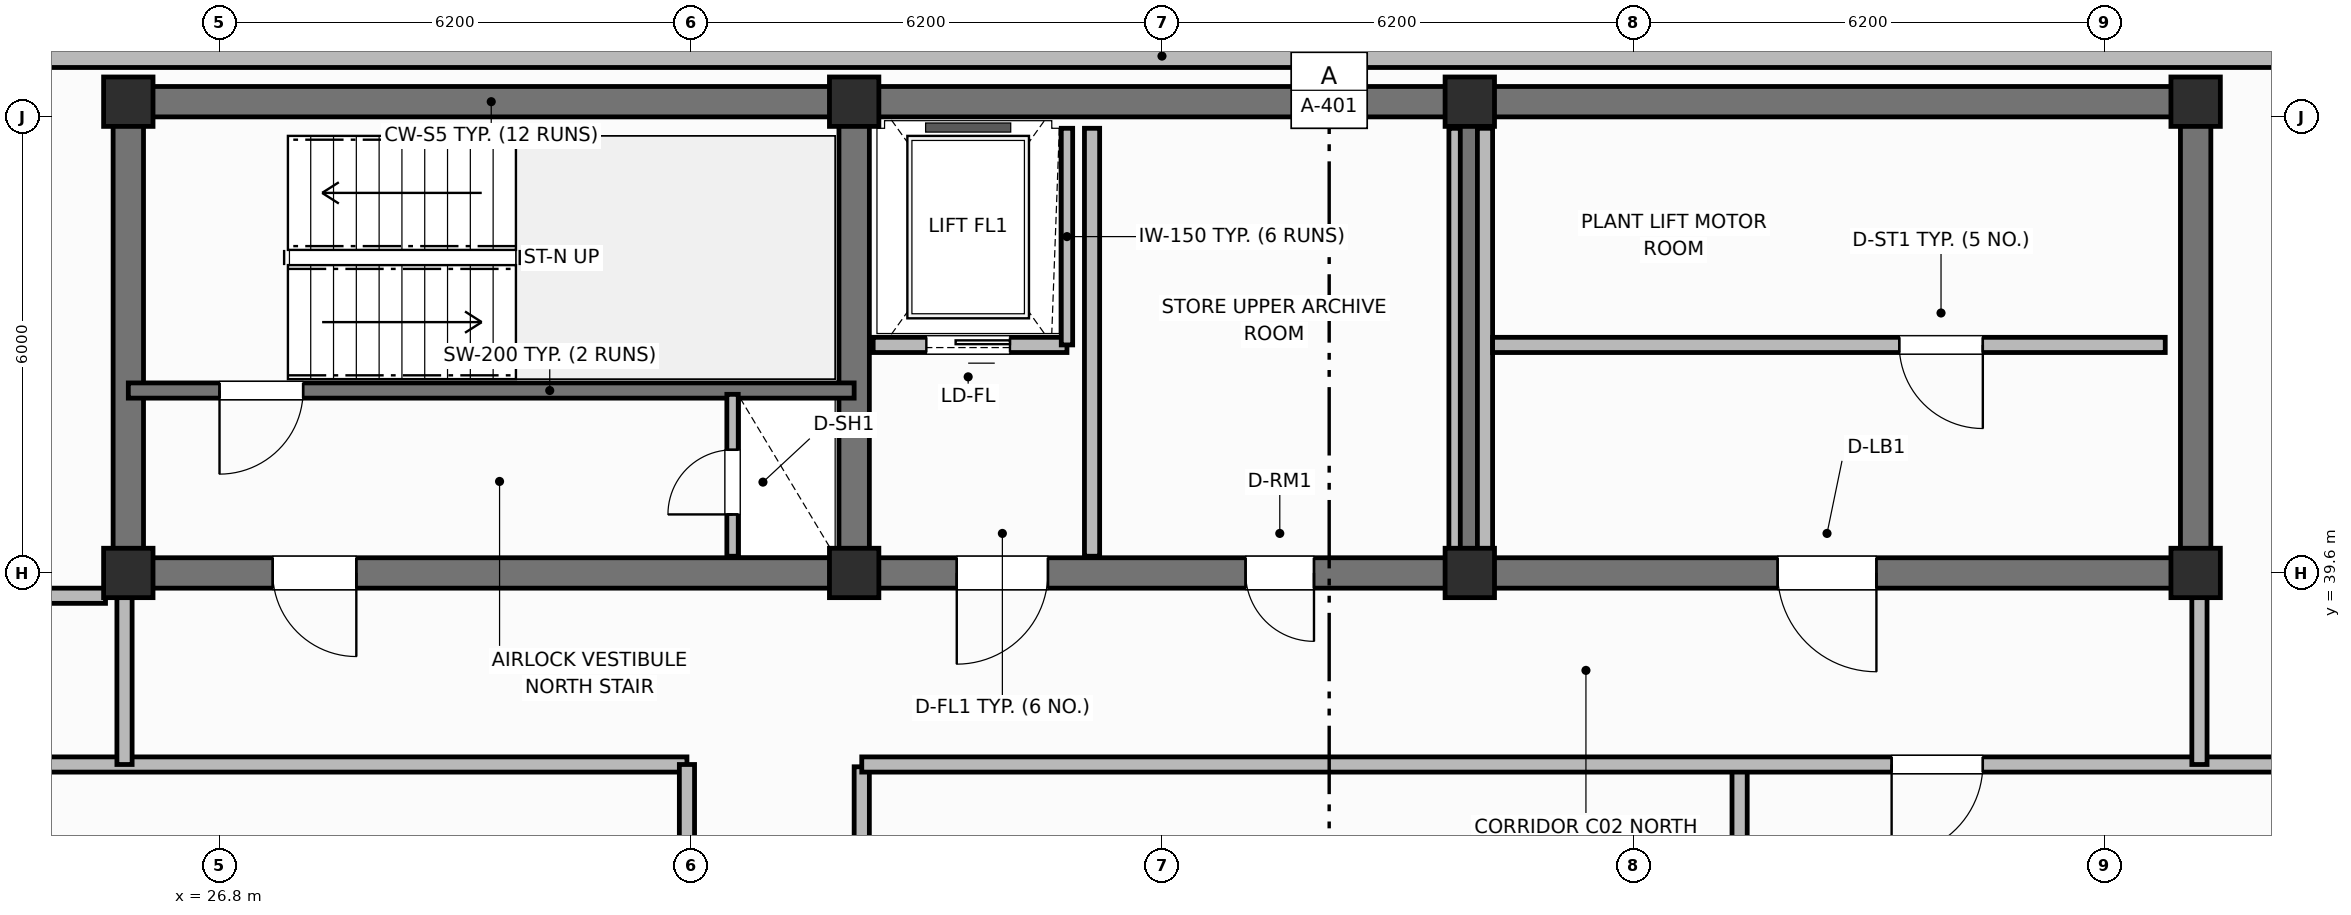
"""IFC4 building model, lengths in metres.
Left out: names, types, materials, properties, quantities, classifications, styles, units other than length and angle.
Written with IfcOpenShell. Run it as: python <this file> out.ifc"""

import sys

from ifc_helpers import new_model, si_unit, direction, frame, frame_2d, origin, origin_2d, place, context, subcontext, project, spatial, rectangle, extrude, element, fill, save


model = new_model("IFC4")
c1 = context("Model", 3, precision=1e-05, world=origin(), true_north=direction((0.0, 1.0)))
c2 = subcontext(c1, "Body", "Model", "MODEL_VIEW")
j1 = project(units=[si_unit("LENGTHUNIT", "METRE"), si_unit("PLANEANGLEUNIT", "RADIAN")], contexts=[c1])
p1 = place(None, origin())
s1 = spatial("IfcSite", under=j1, at=p1, CompositionType="ELEMENT")
p2 = place(p1, origin())
s2 = spatial("IfcBuilding", under=s1, at=p2, CompositionType="ELEMENT")
p3 = place(p2, frame((0.0, 0.0, 305.6)))
s3 = spatial("IfcBuildingStorey", under=s2, at=p3, CompositionType="ELEMENT", Elevation=305.6)
p4 = place(p3, frame((25.6, 45.8, 0.0), z_axis=(0.0, 0.0, 1.0), x_axis=(1.0, 0.0, 0.0)))
e1 = element("IfcWall", 1, at=p4, inside=s3, PredefinedType="SHEAR", context=c2, shape_type="SweptSolid", body=[
    extrude(rectangle(XDim=27.2, YDim=0.4, at=frame_2d((13.6, 0.0))), origin(), (0.0, 0.0, 1.0), 3.6),
])
for number, where, z_axis, x_axis in (
    (2, (25.6, 39.8, 0.0), (0.0, 0.0, 1.0), (0.0, 1.0, 0.0)),
    (3, (52.8, 39.8, 0.0), (0.0, 0.0, 1.0), (0.0, 1.0, 0.0)),
):
    element("IfcWall", number, at=place(p3, frame(where, z_axis=z_axis, x_axis=x_axis)), inside=s3, PredefinedType="SHEAR", context=c2, shape_type="SweptSolid", body=[
        extrude(rectangle(XDim=5.8, YDim=0.4, at=frame_2d((2.9, 0.0))), origin(), (0.0, 0.0, 1.0), 3.6),
    ])
p5 = place(p3, frame((52.8, 39.6, 0.0), z_axis=(0.0, 0.0, 1.0), x_axis=(-1.0, 0.0, 0.0)))
e4 = element("IfcWall", 4, at=p5, inside=s3, PredefinedType="SHEAR", context=c2, shape_type="SweptSolid", body=[
    extrude(rectangle(XDim=27.2, YDim=0.4, at=frame_2d((13.6, 0.0))), origin(), (0.0, 0.0, 1.0), 3.6),
])
p6 = place(p5, frame((24.2, 0.0, 0.0)))
e5 = element("IfcOpeningElement", 5, at=p6, cuts=e4, PredefinedType="OPENING", context=c2, shape_type="SweptSolid", body=[
    extrude(rectangle(XDim=1.1, YDim=2.15, at=frame_2d((0.55, 1.075))), frame((0.0, 0.21, 0.0), z_axis=(0.0, -1.0, 0.0), x_axis=(1.0, 0.0, 0.0)), (0.0, 0.0, 1.0), 0.42),
])
p7 = place(p5, frame((15.1, 0.0, 0.0)))
e6 = element("IfcOpeningElement", 6, at=p7, cuts=e4, PredefinedType="OPENING", context=c2, shape_type="SweptSolid", body=[
    extrude(rectangle(XDim=1.2, YDim=2.15, at=frame_2d((0.6, 1.075))), frame((0.0, 0.21, 0.0), z_axis=(0.0, -1.0, 0.0), x_axis=(1.0, 0.0, 0.0)), (0.0, 0.0, 1.0), 0.42),
])
p8 = place(p5, frame((11.6, 0.0, 0.0)))
e7 = element("IfcOpeningElement", 7, at=p8, cuts=e4, PredefinedType="OPENING", context=c2, shape_type="SweptSolid", body=[
    extrude(rectangle(XDim=0.9, YDim=2.1, at=frame_2d((0.45, 1.05))), frame((0.0, 0.21, 0.0), z_axis=(0.0, -1.0, 0.0), x_axis=(1.0, 0.0, 0.0)), (0.0, 0.0, 1.0), 0.42),
])
p9 = place(p5, frame((4.2, 0.0, 0.0)))
e8 = element("IfcOpeningElement", 8, at=p9, cuts=e4, PredefinedType="OPENING", context=c2, shape_type="SweptSolid", body=[
    extrude(rectangle(XDim=1.3, YDim=2.2, at=frame_2d((0.65, 1.1))), frame((0.0, 0.21, 0.0), z_axis=(0.0, -1.0, 0.0), x_axis=(1.0, 0.0, 0.0)), (0.0, 0.0, 1.0), 0.42),
])
for number, where, z_axis, x_axis in (
    (9, (35.15, 39.8, 0.0), (0.0, 0.0, 1.0), (0.0, 1.0, 0.0)),
    (10, (43.25, 39.8, 0.0), (0.0, 0.0, 1.0), (0.0, 1.0, 0.0)),
):
    element("IfcWall", number, at=place(p3, frame(where, z_axis=z_axis, x_axis=x_axis)), inside=s3, PredefinedType="SHEAR", context=c2, shape_type="SweptSolid", body=[
        extrude(rectangle(XDim=5.8, YDim=0.4, at=frame_2d((2.9, 0.0))), origin(), (0.0, 0.0, 1.0), 3.6),
    ])
for number, where, z_axis, x_axis in (
    (11, (25.6, 39.6, 0.0), (0.0, 0.0, 1.0), (1.0, 0.0, 0.0)),
    (12, (25.6, 45.8, 0.0), (0.0, 0.0, 1.0), (1.0, 0.0, 0.0)),
    (13, (35.15, 39.6, 0.0), (0.0, 0.0, 1.0), (1.0, 0.0, 0.0)),
    (14, (35.15, 45.8, 0.0), (0.0, 0.0, 1.0), (1.0, 0.0, 0.0)),
    (15, (43.25, 39.6, 0.0), (0.0, 0.0, 1.0), (1.0, 0.0, 0.0)),
    (16, (43.25, 45.8, 0.0), (0.0, 0.0, 1.0), (1.0, 0.0, 0.0)),
    (17, (52.8, 39.6, 0.0), (0.0, 0.0, 1.0), (1.0, 0.0, 0.0)),
    (18, (52.8, 45.8, 0.0), (0.0, 0.0, 1.0), (1.0, 0.0, 0.0)),
):
    element("IfcColumn", number, at=place(p3, frame(where, z_axis=z_axis, x_axis=x_axis)), inside=s3, PredefinedType="COLUMN", context=c2, shape_type="SweptSolid", body=[
        extrude(rectangle(XDim=0.65, YDim=0.65, at=origin_2d()), origin(), (0.0, 0.0, 1.0), 3.6),
    ])
p10 = place(p3, frame((54.64, 46.4, 0.0), z_axis=(0.0, 0.0, 1.0), x_axis=(-1.0, 0.0, 0.0)))
e19 = element("IfcWall", 19, at=p10, inside=s3, PredefinedType="SOLIDWALL", context=c2, shape_type="SweptSolid", body=[
    extrude(rectangle(XDim=30.88, YDim=0.3, at=frame_2d((15.44, 0.0))), origin(), (0.0, 0.0, 1.0), 2.84),
])
p11 = place(p3, frame((35.15, 42.0, 0.0), z_axis=(0.0, 0.0, 1.0), x_axis=(-1.0, 0.0, 0.0)))
e20 = element("IfcWall", 20, at=p11, inside=s3, PredefinedType="SHEAR", context=c2, shape_type="SweptSolid", body=[
    extrude(rectangle(XDim=9.55, YDim=0.2, at=frame_2d((4.775, 0.0))), origin(), (0.0, 0.0, 1.0), 3.6),
])
p12 = place(p11, frame((7.25, 0.0, 0.0)))
e21 = element("IfcOpeningElement", 21, at=p12, cuts=e20, PredefinedType="OPENING", context=c2, shape_type="SweptSolid", body=[
    extrude(rectangle(XDim=1.1, YDim=2.15, at=frame_2d((0.55, 1.075))), frame((0.0, 0.11, 0.0), z_axis=(0.0, -1.0, 0.0), x_axis=(1.0, 0.0, 0.0)), (0.0, 0.0, 1.0), 0.22),
])
p13 = place(p3, frame((33.55, 39.82, 0.0), z_axis=(0.0, 0.0, 1.0), x_axis=(0.0, 1.0, 0.0)))
e22 = element("IfcWall", 22, at=p13, inside=s3, PredefinedType="PARTITIONING", context=c2, shape_type="SweptSolid", body=[
    extrude(rectangle(XDim=2.13, YDim=0.15, at=frame_2d((1.065, 0.0))), origin(), (0.0, 0.0, 1.0), 2.54),
])
p14 = place(p13, frame((0.55, 0.0, 0.0)))
e23 = element("IfcOpeningElement", 23, at=p14, cuts=e22, PredefinedType="OPENING", context=c2, shape_type="SweptSolid", body=[
    extrude(rectangle(XDim=0.85, YDim=2.05, at=frame_2d((0.425, 1.025))), frame((0.0, 0.085, 0.0), z_axis=(0.0, -1.0, 0.0), x_axis=(1.0, 0.0, 0.0)), (0.0, 0.0, 1.0), 0.17),
])
p15 = place(p3, frame((37.95, 42.6, 0.0), z_axis=(0.0, 0.0, 1.0), x_axis=(-1.0, 0.0, 0.0)))
e24 = element("IfcWall", 24, at=p15, inside=s3, PredefinedType="PARTITIONING", context=c2, shape_type="SweptSolid", body=[
    extrude(rectangle(XDim=2.55, YDim=0.2, at=frame_2d((1.275, 0.0))), origin(), (0.0, 0.0, 1.0), 2.2),
])
p16 = place(p15, frame((0.75, 0.0, 0.0)))
e25 = element("IfcOpeningElement", 25, at=p16, cuts=e24, PredefinedType="OPENING", context=c2, shape_type="SweptSolid", body=[
    extrude(rectangle(XDim=1.1, YDim=2.15, at=frame_2d((0.55, 1.075))), frame((0.0, 0.11, 0.0), z_axis=(0.0, -1.0, 0.0), x_axis=(1.0, 0.0, 0.0)), (0.0, 0.0, 1.0), 0.22),
])
p17 = place(p3, frame((37.95, 42.6, 0.0), z_axis=(0.0, 0.0, 1.0), x_axis=(0.0, 1.0, 0.0)))
e26 = element("IfcWall", 26, at=p17, inside=s3, PredefinedType="PARTITIONING", context=c2, shape_type="SweptSolid", body=[
    extrude(rectangle(XDim=2.85, YDim=0.15, at=frame_2d((1.425, 0.0))), origin(), (0.0, 0.0, 1.0), 2.54),
])
p18 = place(p3, frame((38.28, 39.82, 0.0), z_axis=(0.0, 0.0, 1.0), x_axis=(0.0, 1.0, 0.0)))
e27 = element("IfcWall", 27, at=p18, inside=s3, PredefinedType="PARTITIONING", context=c2, shape_type="SweptSolid", body=[
    extrude(rectangle(XDim=5.63, YDim=0.2, at=frame_2d((2.815, 0.0))), origin(), (0.0, 0.0, 1.0), 2.54),
])
p19 = place(p3, frame((43.05, 39.82, 0.0), z_axis=(0.0, 0.0, 1.0), x_axis=(0.0, 1.0, 0.0)))
e28 = element("IfcWall", 28, at=p19, inside=s3, PredefinedType="PARTITIONING", context=c2, shape_type="SweptSolid", body=[
    extrude(rectangle(XDim=5.63, YDim=0.15, at=frame_2d((2.815, 0.0))), origin(), (0.0, 0.0, 1.0), 2.54),
])
p20 = place(p3, frame((43.45, 39.82, 0.0), z_axis=(0.0, 0.0, 1.0), x_axis=(0.0, 1.0, 0.0)))
e29 = element("IfcWall", 29, at=p20, inside=s3, PredefinedType="PARTITIONING", context=c2, shape_type="SweptSolid", body=[
    extrude(rectangle(XDim=5.63, YDim=0.2, at=frame_2d((2.815, 0.0))), origin(), (0.0, 0.0, 1.0), 2.54),
])
p21 = place(p3, frame((52.4, 42.6, 0.0), z_axis=(0.0, 0.0, 1.0), x_axis=(-1.0, 0.0, 0.0)))
e30 = element("IfcWall", 30, at=p21, inside=s3, PredefinedType="PARTITIONING", context=c2, shape_type="SweptSolid", body=[
    extrude(rectangle(XDim=8.85, YDim=0.2, at=frame_2d((4.425, 0.0))), origin(), (0.0, 0.0, 1.0), 2.54),
])
p22 = place(p21, frame((2.4, 0.0, 0.0)))
e31 = element("IfcOpeningElement", 31, at=p22, cuts=e30, PredefinedType="OPENING", context=c2, shape_type="SweptSolid", body=[
    extrude(rectangle(XDim=1.1, YDim=2.15, at=frame_2d((0.55, 1.075))), frame((0.0, 0.11, 0.0), z_axis=(0.0, -1.0, 0.0), x_axis=(1.0, 0.0, 0.0)), (0.0, 0.0, 1.0), 0.22),
])
p23 = place(p3, frame((21.53, 37.08, 0.0), z_axis=(0.0, 0.0, 1.0), x_axis=(1.0, 0.0, 0.0)))
e32 = element("IfcWall", 32, at=p23, inside=s3, PredefinedType="PARTITIONING", context=c2, shape_type="SweptSolid", body=[
    extrude(rectangle(XDim=11.42, YDim=0.2, at=frame_2d((5.71, 0.0))), origin(), (0.0, 0.0, 1.0), 2.54),
])
p24 = place(p3, frame((32.95, 19.32, 0.0), z_axis=(0.0, 0.0, 1.0), x_axis=(0.0, 1.0, 0.0)))
e33 = element("IfcWall", 33, at=p24, inside=s3, PredefinedType="PARTITIONING", context=c2, shape_type="SweptSolid", body=[
    extrude(rectangle(XDim=17.76, YDim=0.2, at=frame_2d((8.88, 0.0))), origin(), (0.0, 0.0, 1.0), 2.54),
])
p25 = place(p24, frame((6.0, 0.0, 0.0)))
e34 = element("IfcOpeningElement", 34, at=p25, cuts=e33, PredefinedType="OPENING", context=c2, shape_type="SweptSolid", body=[
    extrude(rectangle(XDim=1.2, YDim=2.15, at=frame_2d((0.6, 1.075))), frame((0.0, 0.11, 0.0), z_axis=(0.0, -1.0, 0.0), x_axis=(1.0, 0.0, 0.0)), (0.0, 0.0, 1.0), 0.22),
])
p26 = place(p3, frame((35.25, 19.35, 0.0), z_axis=(0.0, 0.0, 1.0), x_axis=(0.0, 1.0, 0.0)))
e35 = element("IfcWall", 35, at=p26, inside=s3, PredefinedType="PARTITIONING", context=c2, shape_type="SweptSolid", body=[
    extrude(rectangle(XDim=17.7, YDim=0.2, at=frame_2d((8.85, 0.0))), origin(), (0.0, 0.0, 1.0), 2.54),
])
p27 = place(p26, frame((6.0, 0.0, 0.0)))
e36 = element("IfcOpeningElement", 36, at=p27, cuts=e35, PredefinedType="OPENING", context=c2, shape_type="SweptSolid", body=[
    extrude(rectangle(XDim=1.2, YDim=2.15, at=frame_2d((0.6, 1.075))), frame((0.0, 0.11, 0.0), z_axis=(0.0, -1.0, 0.0), x_axis=(1.0, 0.0, 0.0)), (0.0, 0.0, 1.0), 0.22),
])
p28 = place(p3, frame((46.8, 19.35, 0.0), z_axis=(0.0, 0.0, 1.0), x_axis=(0.0, 1.0, 0.0)))
e37 = element("IfcWall", 37, at=p28, inside=s3, PredefinedType="PARTITIONING", context=c2, shape_type="SweptSolid", body=[
    extrude(rectangle(XDim=17.7, YDim=0.2, at=frame_2d((8.85, 0.0))), origin(), (0.0, 0.0, 1.0), 2.54),
])
p29 = place(p3, frame((56.87, 37.08, 0.0), z_axis=(0.0, 0.0, 1.0), x_axis=(-1.0, 0.0, 0.0)))
e38 = element("IfcWall", 38, at=p29, inside=s3, PredefinedType="PARTITIONING", context=c2, shape_type="SweptSolid", body=[
    extrude(rectangle(XDim=21.62, YDim=0.2, at=frame_2d((10.81, 0.0))), origin(), (0.0, 0.0, 1.0), 2.54),
])
p30 = place(p29, frame((6.87, 0.0, 0.0)))
e39 = element("IfcOpeningElement", 39, at=p30, cuts=e38, PredefinedType="OPENING", context=c2, shape_type="SweptSolid", body=[
    extrude(rectangle(XDim=1.2, YDim=2.15, at=frame_2d((0.6, 1.075))), frame((0.0, 0.11, 0.0), z_axis=(0.0, -1.0, 0.0), x_axis=(1.0, 0.0, 0.0)), (0.0, 0.0, 1.0), 0.22),
])
for number, where, z_axis, x_axis in (
    (40, (52.85, 37.08, 0.0), (0.0, 0.0, 1.0), (0.0, 1.0, 0.0)),
    (41, (25.55, 37.08, 0.0), (0.0, 0.0, 1.0), (0.0, 1.0, 0.0)),
):
    element("IfcWall", number, at=place(p3, frame(where, z_axis=z_axis, x_axis=x_axis)), inside=s3, PredefinedType="PARTITIONING", context=c2, shape_type="SweptSolid", body=[
        extrude(rectangle(XDim=2.37, YDim=0.2, at=frame_2d((1.185, 0.0))), origin(), (0.0, 0.0, 1.0), 2.54),
    ])
p31 = place(p3, frame((21.53, 39.3, 0.0), z_axis=(0.0, 0.0, 1.0), x_axis=(1.0, 0.0, 0.0)))
e42 = element("IfcWall", 42, at=p31, inside=s3, PredefinedType="PARTITIONING", context=c2, shape_type="SweptSolid", body=[
    extrude(rectangle(XDim=3.77, YDim=0.2, at=frame_2d((1.885, 0.0))), origin(), (0.0, 0.0, 1.0), 2.54),
])
p32 = place(p12, origin())
e43 = element("IfcDoor", 43, at=p32, inside=s3, OperationType="SINGLE_SWING_RIGHT", PredefinedType="DOOR", context=c2, shape_type="SweptSolid", body=[
    extrude(rectangle(XDim=1.1, YDim=2.15, at=frame_2d((0.55, 1.075))), frame((0.0, 0.025, 0.0), z_axis=(0.0, -1.0, 0.0), x_axis=(1.0, 0.0, 0.0)), (0.0, 0.0, 1.0), 0.05),
])
fill(e21, e43)
p33 = place(p14, origin())
e44 = element("IfcDoor", 44, at=p33, inside=s3, OperationType="SINGLE_SWING_LEFT", PredefinedType="TRAPDOOR", context=c2, shape_type="SweptSolid", body=[
    extrude(rectangle(XDim=0.85, YDim=2.05, at=frame_2d((0.425, 1.025))), frame((0.0, 0.025, 0.0), z_axis=(0.0, -1.0, 0.0), x_axis=(1.0, 0.0, 0.0)), (0.0, 0.0, 1.0), 0.05),
])
fill(e23, e44)
p34 = place(p16, origin())
e45 = element("IfcDoor", 45, at=p34, inside=s3, OperationType="SLIDING_TO_LEFT", PredefinedType="DOOR", context=c2, shape_type="SweptSolid", body=[
    extrude(rectangle(XDim=1.1, YDim=2.15, at=frame_2d((0.55, 1.075))), frame((0.0, 0.025, 0.0), z_axis=(0.0, -1.0, 0.0), x_axis=(1.0, 0.0, 0.0)), (0.0, 0.0, 1.0), 0.05),
])
fill(e25, e45)
p35 = place(p22, origin())
e46 = element("IfcDoor", 46, at=p35, inside=s3, OperationType="SINGLE_SWING_LEFT", PredefinedType="DOOR", context=c2, shape_type="SweptSolid", body=[
    extrude(rectangle(XDim=1.1, YDim=2.15, at=frame_2d((0.55, 1.075))), frame((0.0, 0.025, 0.0), z_axis=(0.0, -1.0, 0.0), x_axis=(1.0, 0.0, 0.0)), (0.0, 0.0, 1.0), 0.05),
])
fill(e31, e46)
p36 = place(p30, origin())
e47 = element("IfcDoor", 47, at=p36, inside=s3, OperationType="SINGLE_SWING_RIGHT", PredefinedType="DOOR", context=c2, shape_type="SweptSolid", body=[
    extrude(rectangle(XDim=1.2, YDim=2.15, at=frame_2d((0.6, 1.075))), frame((0.0, 0.025, 0.0), z_axis=(0.0, -1.0, 0.0), x_axis=(1.0, 0.0, 0.0)), (0.0, 0.0, 1.0), 0.05),
])
fill(e39, e47)
p37 = place(p6, origin())
e48 = element("IfcDoor", 48, at=p37, inside=s3, OperationType="SINGLE_SWING_LEFT", PredefinedType="DOOR", context=c2, shape_type="SweptSolid", body=[
    extrude(rectangle(XDim=1.1, YDim=2.15, at=frame_2d((0.55, 1.075))), frame((0.0, 0.025, 0.0), z_axis=(0.0, -1.0, 0.0), x_axis=(1.0, 0.0, 0.0)), (0.0, 0.0, 1.0), 0.05),
])
fill(e5, e48)
p38 = place(p7, origin())
e49 = element("IfcDoor", 49, at=p38, inside=s3, OperationType="SINGLE_SWING_RIGHT", PredefinedType="DOOR", context=c2, shape_type="SweptSolid", body=[
    extrude(rectangle(XDim=1.2, YDim=2.15, at=frame_2d((0.6, 1.075))), frame((0.0, 0.025, 0.0), z_axis=(0.0, -1.0, 0.0), x_axis=(1.0, 0.0, 0.0)), (0.0, 0.0, 1.0), 0.05),
])
fill(e6, e49)
p39 = place(p8, origin())
e50 = element("IfcDoor", 50, at=p39, inside=s3, OperationType="SINGLE_SWING_LEFT", PredefinedType="DOOR", context=c2, shape_type="SweptSolid", body=[
    extrude(rectangle(XDim=0.9, YDim=2.1, at=frame_2d((0.45, 1.05))), frame((0.0, 0.025, 0.0), z_axis=(0.0, -1.0, 0.0), x_axis=(1.0, 0.0, 0.0)), (0.0, 0.0, 1.0), 0.05),
])
fill(e7, e50)
p40 = place(p9, origin())
e51 = element("IfcDoor", 51, at=p40, inside=s3, OperationType="SINGLE_SWING_LEFT", PredefinedType="DOOR", context=c2, shape_type="SweptSolid", body=[
    extrude(rectangle(XDim=1.3, YDim=2.2, at=frame_2d((0.65, 1.1))), frame((0.0, 0.025, 0.0), z_axis=(0.0, -1.0, 0.0), x_axis=(1.0, 0.0, 0.0)), (0.0, 0.0, 1.0), 0.05),
])
fill(e8, e51)
save(model, sys.argv[1])
